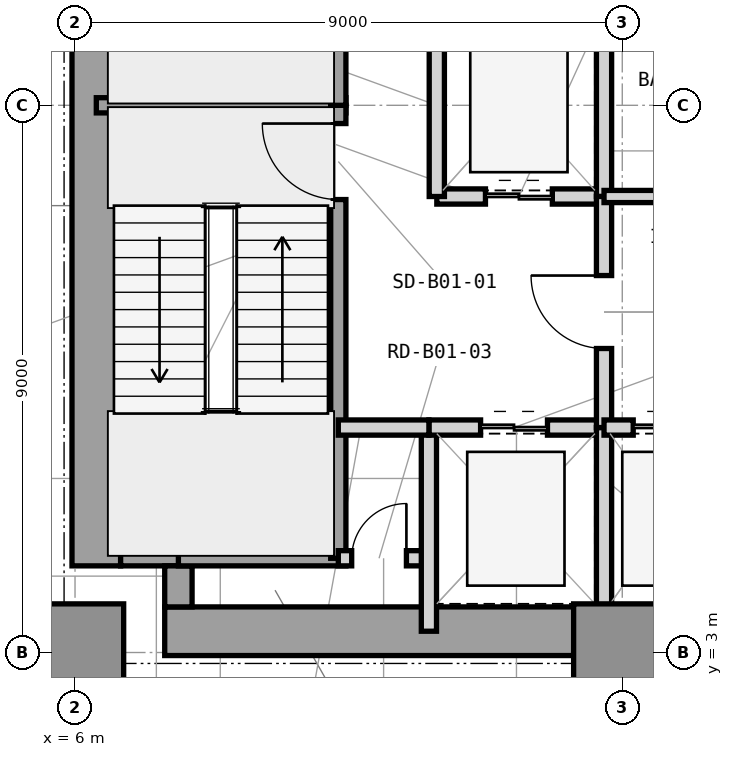
"""IFC4 building model, lengths in metres.
Left out: names, types, materials, properties, quantities, classifications, styles, units other than length and angle.
Written with IfcOpenShell. Run it as: python <this file> out.ifc"""

import sys

from ifc_helpers import new_model, si_unit, direction, frame, frame_2d, origin, origin_2d, place, context, subcontext, project, spatial, rectangle, extrude, element, fill, save


model = new_model("IFC4")
c1 = context("Model", 3, precision=1e-05, world=origin(), true_north=direction((0.0, 1.0)))
c2 = subcontext(c1, "Body", "Model", "MODEL_VIEW")
j1 = project(units=[si_unit("LENGTHUNIT", "METRE"), si_unit("PLANEANGLEUNIT", "RADIAN")], contexts=[c1])
p1 = place(None, origin())
s1 = spatial("IfcSite", under=j1, at=p1, CompositionType="ELEMENT")
p2 = place(p1, origin())
s2 = spatial("IfcBuilding", under=s1, at=p2, CompositionType="ELEMENT")
p3 = place(p2, frame((0.0, 0.0, -4.5)))
s3 = spatial("IfcBuildingStorey", under=s2, at=p3, CompositionType="ELEMENT", Elevation=-4.5)
p4 = place(p3, frame((7.475, 3.35, 0.0), z_axis=(0.0, 0.0, 1.0), x_axis=(1.0, 0.0, 0.0)))
e1 = element("IfcWall", 1, at=p4, inside=s3, PredefinedType="SHEAR", context=c2, shape_type="SweptSolid", body=[
    extrude(rectangle(XDim=16.575, YDim=0.8, at=frame_2d((8.288, 0.0))), origin(), (0.0, 0.0, 1.0), 4.5),
])
p5 = place(p3, frame((6.35, 4.425, 0.0), z_axis=(0.0, 0.0, 1.0), x_axis=(0.0, 1.0, 0.0)))
e2 = element("IfcWall", 2, at=p5, inside=s3, PredefinedType="SHEAR", context=c2, shape_type="SweptSolid", body=[
    extrude(rectangle(XDim=15.15, YDim=0.8, at=frame_2d((7.575, 0.0))), origin(), (0.0, 0.0, 1.0), 4.5),
])
p6 = place(p3, frame((6.75, 4.65, 0.0), z_axis=(0.0, 0.0, 1.0), x_axis=(1.0, 0.0, 0.0)))
e3 = element("IfcWall", 3, at=p6, inside=s3, PredefinedType="SHEAR", context=c2, shape_type="SweptSolid", body=[
    extrude(rectangle(XDim=1.175, YDim=0.45, at=frame_2d((0.587, 0.0))), origin(), (0.0, 0.0, 1.0), 4.5),
])
p7 = place(p3, frame((7.7, 3.75, 0.0), z_axis=(0.0, 0.0, 1.0), x_axis=(0.0, 1.0, 0.0)))
e4 = element("IfcWall", 4, at=p7, inside=s3, PredefinedType="SHEAR", context=c2, shape_type="SweptSolid", body=[
    extrude(rectangle(XDim=0.675, YDim=0.45, at=frame_2d((0.337, 0.0))), origin(), (0.0, 0.0, 1.0), 4.5),
])
for number, where, z_axis, x_axis in (
    (5, (6.0, 3.0, 0.0), (0.0, 0.0, 1.0), (1.0, 0.0, 0.0)),
    (6, (15.0, 3.0, 0.0), (0.0, 0.0, 1.0), (1.0, 0.0, 0.0)),
):
    element("IfcColumn", number, at=place(p3, frame(where, z_axis=z_axis, x_axis=x_axis)), inside=s3, PredefinedType="COLUMN", context=c2, shape_type="SweptSolid", body=[
        extrude(rectangle(XDim=1.6, YDim=1.6, at=origin_2d()), origin(), (0.0, 0.0, 1.0), 4.5),
    ])
p8 = place(p3, frame((6.35, 12.0, 0.0), z_axis=(0.0, 0.0, 1.0), x_axis=(1.0, 0.0, 0.0)))
e7 = element("IfcWall", 7, at=p8, inside=s3, PredefinedType="SHEAR", context=c2, shape_type="SweptSolid", body=[
    extrude(rectangle(XDim=4.105, YDim=0.25, at=frame_2d((2.052, 0.0))), origin(), (0.0, 0.0, 1.0), 4.5),
])
p9 = place(p3, frame((7.7, 4.55, 0.0), z_axis=(0.0, 0.0, 1.0), x_axis=(1.0, 0.0, 0.0)))
e8 = element("IfcWall", 8, at=p9, inside=s3, PredefinedType="SHEAR", context=c2, shape_type="SweptSolid", body=[
    extrude(rectangle(XDim=2.755, YDim=0.25, at=frame_2d((1.377, 0.0))), origin(), (0.0, 0.0, 1.0), 4.5),
])
p10 = place(p3, frame((10.33, 4.55, 0.0), z_axis=(0.0, 0.0, 1.0), x_axis=(0.0, 1.0, 0.0)))
e9 = element("IfcWall", 9, at=p10, inside=s3, PredefinedType="SHEAR", context=c2, shape_type="SweptSolid", body=[
    extrude(rectangle(XDim=7.45, YDim=0.25, at=frame_2d((3.725, 0.0))), origin(), (0.0, 0.0, 1.0), 4.5),
])
p11 = place(p10, frame((5.9, 0.0, 0.0)))
e10 = element("IfcOpeningElement", 10, at=p11, cuts=e9, PredefinedType="OPENING", context=c2, shape_type="SweptSolid", body=[
    extrude(rectangle(XDim=1.25, YDim=2.2, at=frame_2d((0.625, 1.1))), frame((0.0, 0.135, 0.0), z_axis=(0.0, -1.0, 0.0), x_axis=(1.0, 0.0, 0.0)), (0.0, 0.0, 1.0), 0.27),
])
p12 = place(p3, frame((10.33, 12.0, 0.0), z_axis=(0.0, 0.0, 1.0), x_axis=(0.0, 1.0, 0.0)))
e11 = element("IfcWall", 11, at=p12, inside=s3, PredefinedType="SHEAR", context=c2, shape_type="SweptSolid", body=[
    extrude(rectangle(XDim=7.45, YDim=0.25, at=frame_2d((3.725, 0.0))), origin(), (0.0, 0.0, 1.0), 4.5),
])
p13 = place(p12, frame((5.85, 0.0, 0.0)))
e12 = element("IfcOpeningElement", 12, at=p13, cuts=e11, PredefinedType="OPENING", context=c2, shape_type="SweptSolid", body=[
    extrude(rectangle(XDim=1.25, YDim=2.2, at=frame_2d((0.625, 1.1))), frame((0.0, 0.135, 0.0), z_axis=(0.0, -1.0, 0.0), x_axis=(1.0, 0.0, 0.0)), (0.0, 0.0, 1.0), 0.27),
])
p14 = place(p3, frame((10.33, 4.55, 0.0), z_axis=(0.0, 0.0, 1.0), x_axis=(1.0, 0.0, 0.0)))
e13 = element("IfcWall", 13, at=p14, inside=s3, PredefinedType="PARTITIONING", context=c2, shape_type="SweptSolid", body=[
    extrude(rectangle(XDim=1.49, YDim=0.25, at=frame_2d((0.745, 0.0))), origin(), (0.0, 0.0, 1.0), 4.19),
])
p15 = place(p14, frame((0.22, 0.0, 0.0)))
e14 = element("IfcOpeningElement", 14, at=p15, cuts=e13, PredefinedType="OPENING", context=c2, shape_type="SweptSolid", body=[
    extrude(rectangle(XDim=0.9, YDim=2.1, at=frame_2d((0.45, 1.05))), frame((0.0, 0.135, 0.0), z_axis=(0.0, -1.0, 0.0), x_axis=(1.0, 0.0, 0.0)), (0.0, 0.0, 1.0), 0.27),
])
p16 = place(p3, frame((11.82, 3.35, 0.0), z_axis=(0.0, 0.0, 1.0), x_axis=(0.0, 1.0, 0.0)))
e15 = element("IfcWall", 15, at=p16, inside=s3, PredefinedType="PARTITIONING", context=c2, shape_type="SweptSolid", body=[
    extrude(rectangle(XDim=3.35, YDim=0.25, at=frame_2d((1.675, 0.0))), origin(), (0.0, 0.0, 1.0), 4.19),
])
p17 = place(p3, frame((11.82, 6.7, 0.0), z_axis=(0.0, 0.0, 1.0), x_axis=(1.0, 0.0, 0.0)))
e16 = element("IfcWall", 16, at=p17, inside=s3, PredefinedType="PARTITIONING", context=c2, shape_type="SweptSolid", body=[
    extrude(rectangle(XDim=2.88, YDim=0.25, at=frame_2d((1.44, 0.0))), origin(), (0.0, 0.0, 1.0), 3.573),
])
p18 = place(p17, frame((0.85, 0.0, 0.0)))
e17 = element("IfcOpeningElement", 17, at=p18, cuts=e16, PredefinedType="OPENING", context=c2, shape_type="SweptSolid", body=[
    extrude(rectangle(XDim=1.1, YDim=2.25, at=frame_2d((0.55, 1.125))), frame((0.0, 0.135, 0.0), z_axis=(0.0, -1.0, 0.0), x_axis=(1.0, 0.0, 0.0)), (0.0, 0.0, 1.0), 0.27),
])
p19 = place(p3, frame((14.7, 3.35, 0.0), z_axis=(0.0, 0.0, 1.0), x_axis=(0.0, 1.0, 0.0)))
e18 = element("IfcWall", 18, at=p19, inside=s3, PredefinedType="PARTITIONING", context=c2, shape_type="SweptSolid", body=[
    extrude(rectangle(XDim=3.35, YDim=0.25, at=frame_2d((1.675, 0.0))), origin(), (0.0, 0.0, 1.0), 4.19),
])
p20 = place(p3, frame((11.95, 10.5, 0.0), z_axis=(0.0, 0.0, 1.0), x_axis=(1.0, 0.0, 0.0)))
e19 = element("IfcWall", 19, at=p20, inside=s3, PredefinedType="PARTITIONING", context=c2, shape_type="SweptSolid", body=[
    extrude(rectangle(XDim=2.75, YDim=0.25, at=frame_2d((1.375, 0.0))), origin(), (0.0, 0.0, 1.0), 3.573),
])
p21 = place(p20, frame((0.8, 0.0, 0.0)))
e20 = element("IfcOpeningElement", 20, at=p21, cuts=e19, PredefinedType="OPENING", context=c2, shape_type="SweptSolid", body=[
    extrude(rectangle(XDim=1.1, YDim=2.25, at=frame_2d((0.55, 1.125))), frame((0.0, 0.135, 0.0), z_axis=(0.0, -1.0, 0.0), x_axis=(1.0, 0.0, 0.0)), (0.0, 0.0, 1.0), 0.27),
])
for number, where, z_axis, x_axis in (
    (21, (11.95, 10.5, 0.0), (0.0, 0.0, 1.0), (0.0, 1.0, 0.0)),
    (22, (14.7, 10.5, 0.0), (0.0, 0.0, 1.0), (0.0, 1.0, 0.0)),
):
    element("IfcWall", number, at=place(p3, frame(where, z_axis=z_axis, x_axis=x_axis)), inside=s3, PredefinedType="PARTITIONING", context=c2, shape_type="SweptSolid", body=[
        extrude(rectangle(XDim=3.0, YDim=0.25, at=frame_2d((1.5, 0.0))), origin(), (0.0, 0.0, 1.0), 4.19),
    ])
p22 = place(p3, frame((14.7, 6.7, 0.0), z_axis=(0.0, 0.0, 1.0), x_axis=(0.0, 1.0, 0.0)))
e23 = element("IfcWall", 23, at=p22, inside=s3, PredefinedType="PARTITIONING", context=c2, shape_type="SweptSolid", body=[
    extrude(rectangle(XDim=3.8, YDim=0.25, at=frame_2d((1.9, 0.0))), origin(), (0.0, 0.0, 1.0), 4.19),
])
p23 = place(p22, frame((1.3, 0.0, 0.0)))
e24 = element("IfcOpeningElement", 24, at=p23, cuts=e23, PredefinedType="OPENING", context=c2, shape_type="SweptSolid", body=[
    extrude(rectangle(XDim=1.2, YDim=2.2, at=frame_2d((0.6, 1.1))), frame((0.0, 0.135, 0.0), z_axis=(0.0, -1.0, 0.0), x_axis=(1.0, 0.0, 0.0)), (0.0, 0.0, 1.0), 0.27),
])
p24 = place(p3, frame((10.33, 6.7, 0.0), z_axis=(0.0, 0.0, 1.0), x_axis=(1.0, 0.0, 0.0)))
e25 = element("IfcWall", 25, at=p24, inside=s3, PredefinedType="PARTITIONING", context=c2, shape_type="SweptSolid", body=[
    extrude(rectangle(XDim=1.49, YDim=0.25, at=frame_2d((0.745, 0.0))), origin(), (0.0, 0.0, 1.0), 3.573),
])
p25 = place(p3, frame((14.7, 6.7, 0.0), z_axis=(0.0, 0.0, 1.0), x_axis=(1.0, 0.0, 0.0)))
e26 = element("IfcWall", 26, at=p25, inside=s3, PredefinedType="PARTITIONING", context=c2, shape_type="SweptSolid", body=[
    extrude(rectangle(XDim=2.15, YDim=0.25, at=frame_2d((1.075, 0.0))), origin(), (0.0, 0.0, 1.0), 3.573),
])
p26 = place(p25, frame((0.48, 0.0, 0.0)))
e27 = element("IfcOpeningElement", 27, at=p26, cuts=e26, PredefinedType="OPENING", context=c2, shape_type="SweptSolid", body=[
    extrude(rectangle(XDim=1.15, YDim=2.25, at=frame_2d((0.575, 1.125))), frame((0.0, 0.135, 0.0), z_axis=(0.0, -1.0, 0.0), x_axis=(1.0, 0.0, 0.0)), (0.0, 0.0, 1.0), 0.27),
])
p27 = place(p3, frame((14.7, 10.5, 0.0), z_axis=(0.0, 0.0, 1.0), x_axis=(1.0, 0.0, 0.0)))
e28 = element("IfcWall", 28, at=p27, inside=s3, PredefinedType="PARTITIONING", context=c2, shape_type="SweptSolid", body=[
    extrude(rectangle(XDim=8.95, YDim=0.2, at=frame_2d((4.475, 0.0))), origin(), (0.0, 0.0, 1.0), 3.573),
])
p28 = place(p27, frame((3.2, 0.0, 0.0)))
e29 = element("IfcOpeningElement", 29, at=p28, cuts=e28, PredefinedType="OPENING", context=c2, shape_type="SweptSolid", body=[
    extrude(rectangle(XDim=1.6, YDim=2.3, at=frame_2d((0.8, 1.15))), frame((0.0, 0.11, 0.0), z_axis=(0.0, -1.0, 0.0), x_axis=(1.0, 0.0, 0.0)), (0.0, 0.0, 1.0), 0.22),
])
p29 = place(p11, origin())
e30 = element("IfcDoor", 30, at=p29, inside=s3, OperationType="SINGLE_SWING_RIGHT", PredefinedType="DOOR", context=c2, shape_type="SweptSolid", body=[
    extrude(rectangle(XDim=1.25, YDim=2.2, at=frame_2d((0.625, 1.1))), frame((0.0, 0.025, 0.0), z_axis=(0.0, -1.0, 0.0), x_axis=(1.0, 0.0, 0.0)), (0.0, 0.0, 1.0), 0.05),
])
fill(e10, e30)
p30 = place(p15, origin())
e31 = element("IfcDoor", 31, at=p30, inside=s3, OperationType="SINGLE_SWING_RIGHT", PredefinedType="TRAPDOOR", context=c2, shape_type="SweptSolid", body=[
    extrude(rectangle(XDim=0.9, YDim=2.1, at=frame_2d((0.45, 1.05))), frame((0.0, 0.025, 0.0), z_axis=(0.0, -1.0, 0.0), x_axis=(1.0, 0.0, 0.0)), (0.0, 0.0, 1.0), 0.05),
])
fill(e14, e31)
p31 = place(p18, origin())
e32 = element("IfcDoor", 32, at=p31, inside=s3, OperationType="DOUBLE_DOOR_SLIDING", PredefinedType="DOOR", context=c2, shape_type="SweptSolid", body=[
    extrude(rectangle(XDim=1.1, YDim=2.25, at=frame_2d((0.55, 1.125))), frame((0.0, 0.025, 0.0), z_axis=(0.0, -1.0, 0.0), x_axis=(1.0, 0.0, 0.0)), (0.0, 0.0, 1.0), 0.05),
])
fill(e17, e32)
p32 = place(p21, origin())
e33 = element("IfcDoor", 33, at=p32, inside=s3, OperationType="DOUBLE_DOOR_SLIDING", PredefinedType="DOOR", context=c2, shape_type="SweptSolid", body=[
    extrude(rectangle(XDim=1.1, YDim=2.25, at=frame_2d((0.55, 1.125))), frame((0.0, 0.025, 0.0), z_axis=(0.0, -1.0, 0.0), x_axis=(1.0, 0.0, 0.0)), (0.0, 0.0, 1.0), 0.05),
])
fill(e20, e33)
p33 = place(p23, origin())
e34 = element("IfcDoor", 34, at=p33, inside=s3, OperationType="SINGLE_SWING_RIGHT", PredefinedType="DOOR", context=c2, shape_type="SweptSolid", body=[
    extrude(rectangle(XDim=1.2, YDim=2.2, at=frame_2d((0.6, 1.1))), frame((0.0, 0.025, 0.0), z_axis=(0.0, -1.0, 0.0), x_axis=(1.0, 0.0, 0.0)), (0.0, 0.0, 1.0), 0.05),
])
fill(e24, e34)
p34 = place(p26, origin())
e35 = element("IfcDoor", 35, at=p34, inside=s3, OperationType="DOUBLE_DOOR_SLIDING", PredefinedType="DOOR", context=c2, shape_type="SweptSolid", body=[
    extrude(rectangle(XDim=1.15, YDim=2.25, at=frame_2d((0.575, 1.125))), frame((0.0, 0.025, 0.0), z_axis=(0.0, -1.0, 0.0), x_axis=(1.0, 0.0, 0.0)), (0.0, 0.0, 1.0), 0.05),
])
fill(e27, e35)
save(model, sys.argv[1])
